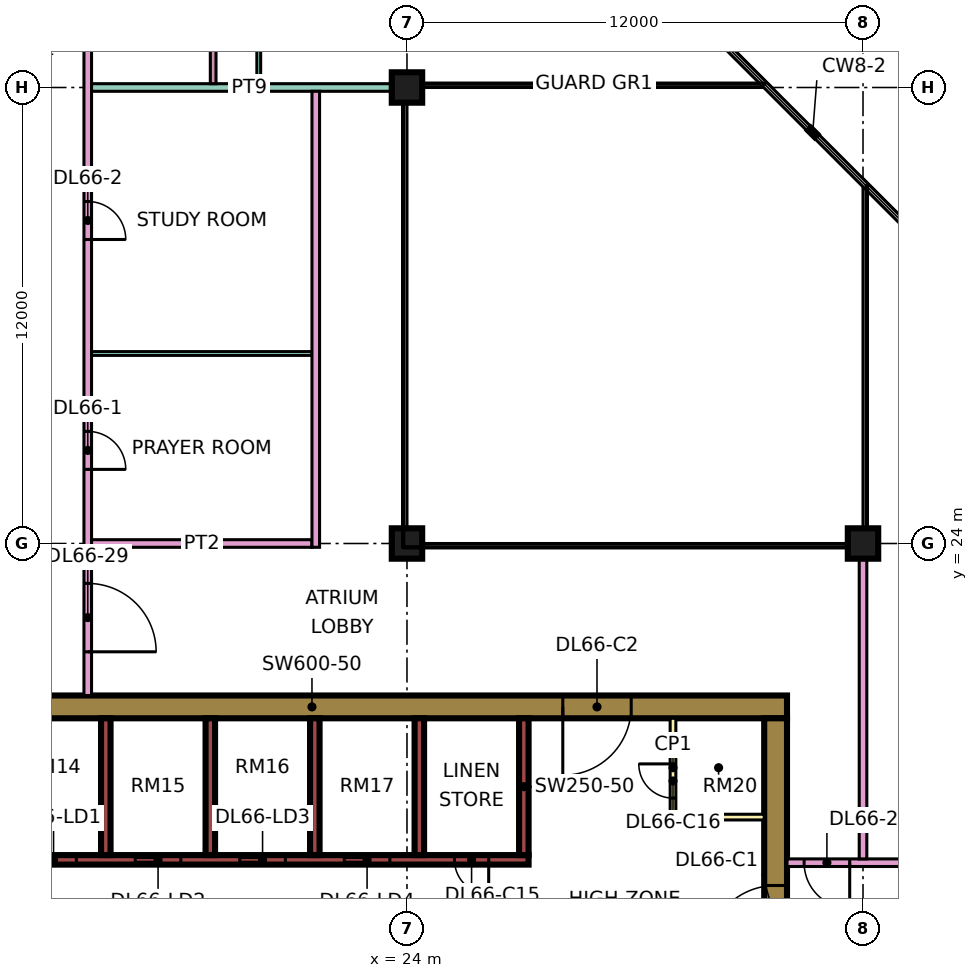
"""IFC4 building model, lengths in metres.
Left out: names, types, materials, properties, quantities, classifications, styles, units other than length and angle.
Written with IfcOpenShell. Run it as: python <this file> out.ifc"""

import sys

from ifc_helpers import new_model, si_unit, direction, frame, frame_2d, origin, origin_2d, place, context, subcontext, project, spatial, rectangle, extrude, element, fill, save


model = new_model("IFC4")
c1 = context("Model", 3, precision=1e-05, world=origin(), true_north=direction((0.0, 1.0)))
c2 = subcontext(c1, "Body", "Model", "MODEL_VIEW")
j1 = project(units=[si_unit("LENGTHUNIT", "METRE"), si_unit("PLANEANGLEUNIT", "RADIAN")], contexts=[c1])
p1 = place(None, origin())
s1 = spatial("IfcSite", under=j1, at=p1, CompositionType="ELEMENT")
p2 = place(p1, origin())
s2 = spatial("IfcBuilding", under=s1, at=p2, CompositionType="ELEMENT")
p3 = place(p2, frame((0.0, 0.0, 284.65)))
s3 = spatial("IfcBuildingStorey", under=s2, at=p3, CompositionType="ELEMENT", Elevation=284.65)
for number, where, z_axis, x_axis in (
    (1, (24.0, 24.0, 0.0), (0.0, 0.0, 1.0), (1.0, 0.0, 0.0)),
    (2, (24.0, 36.0, 0.0), (0.0, 0.0, 1.0), (1.0, 0.0, 0.0)),
    (3, (36.0, 24.0, 0.0), (0.0, 0.0, 1.0), (1.0, 0.0, 0.0)),
):
    element("IfcColumn", number, at=place(p3, frame(where, z_axis=z_axis, x_axis=x_axis)), inside=s3, PredefinedType="COLUMN", context=c2, shape_type="SweptSolid", body=[
        extrude(rectangle(XDim=0.8, YDim=0.8, at=origin_2d()), origin(), (0.0, 0.0, 1.0), 3.75),
    ])
p4 = place(p3, frame((9.0, 19.7, 0.0), z_axis=(0.0, 0.0, 1.0), x_axis=(1.0, 0.0, 0.0)))
e4 = element("IfcWall", 4, at=p4, inside=s3, PredefinedType="SHEAR", context=c2, shape_type="SweptSolid", body=[
    extrude(rectangle(XDim=25.0, YDim=0.6, at=frame_2d((12.5, 0.0))), origin(), (0.0, 0.0, 1.0), 3.75),
])
p5 = place(p4, frame((19.1, 0.0, 0.0)))
e5 = element("IfcOpeningElement", 5, at=p5, cuts=e4, PredefinedType="OPENING", context=c2, shape_type="SweptSolid", body=[
    extrude(rectangle(XDim=1.8, YDim=2.4, at=frame_2d((0.9, 1.2))), frame((0.0, 0.31, 0.0), z_axis=(0.0, -1.0, 0.0), x_axis=(1.0, 0.0, 0.0)), (0.0, 0.0, 1.0), 0.62),
])
p6 = place(p3, frame((33.7, 7.6, 0.0), z_axis=(0.0, 0.0, 1.0), x_axis=(0.0, 1.0, 0.0)))
e6 = element("IfcWall", 6, at=p6, inside=s3, PredefinedType="SHEAR", context=c2, shape_type="SweptSolid", body=[
    extrude(rectangle(XDim=11.8, YDim=0.6, at=frame_2d((5.9, 0.0))), origin(), (0.0, 0.0, 1.0), 3.75),
])
p7 = place(p6, frame((5.6, 0.0, 0.0)))
e7 = element("IfcOpeningElement", 7, at=p7, cuts=e6, PredefinedType="OPENING", context=c2, shape_type="SweptSolid", body=[
    extrude(rectangle(XDim=1.8, YDim=2.4, at=frame_2d((0.9, 1.2))), frame((0.0, 0.31, 0.0), z_axis=(0.0, -1.0, 0.0), x_axis=(1.0, 0.0, 0.0)), (0.0, 0.0, 1.0), 0.62),
])
p8 = place(p3, frame((13.45, 15.675, 0.0), z_axis=(0.0, 0.0, 1.0), x_axis=(1.0, 0.0, 0.0)))
e8 = element("IfcWall", 8, at=p8, inside=s3, PredefinedType="SHEAR", context=c2, shape_type="SweptSolid", body=[
    extrude(rectangle(XDim=13.75, YDim=0.25, at=frame_2d((6.875, 0.0))), origin(), (0.0, 0.0, 1.0), 3.75),
])
p9 = place(p8, frame((0.65, 0.0, 0.0)))
e9 = element("IfcOpeningElement", 9, at=p9, cuts=e8, PredefinedType="OPENING", context=c2, shape_type="SweptSolid", body=[
    extrude(rectangle(XDim=1.2, YDim=2.2, at=frame_2d((0.6, 1.1))), frame((0.0, 0.135, 0.0), z_axis=(0.0, -1.0, 0.0), x_axis=(1.0, 0.0, 0.0)), (0.0, 0.0, 1.0), 0.27),
])
p10 = place(p8, frame((3.4, 0.0, 0.0)))
e10 = element("IfcOpeningElement", 10, at=p10, cuts=e8, PredefinedType="OPENING", context=c2, shape_type="SweptSolid", body=[
    extrude(rectangle(XDim=1.2, YDim=2.2, at=frame_2d((0.6, 1.1))), frame((0.0, 0.135, 0.0), z_axis=(0.0, -1.0, 0.0), x_axis=(1.0, 0.0, 0.0)), (0.0, 0.0, 1.0), 0.27),
])
p11 = place(p8, frame((6.15, 0.0, 0.0)))
e11 = element("IfcOpeningElement", 11, at=p11, cuts=e8, PredefinedType="OPENING", context=c2, shape_type="SweptSolid", body=[
    extrude(rectangle(XDim=1.2, YDim=2.2, at=frame_2d((0.6, 1.1))), frame((0.0, 0.135, 0.0), z_axis=(0.0, -1.0, 0.0), x_axis=(1.0, 0.0, 0.0)), (0.0, 0.0, 1.0), 0.27),
])
p12 = place(p8, frame((8.9, 0.0, 0.0)))
e12 = element("IfcOpeningElement", 12, at=p12, cuts=e8, PredefinedType="OPENING", context=c2, shape_type="SweptSolid", body=[
    extrude(rectangle(XDim=1.2, YDim=2.2, at=frame_2d((0.6, 1.1))), frame((0.0, 0.135, 0.0), z_axis=(0.0, -1.0, 0.0), x_axis=(1.0, 0.0, 0.0)), (0.0, 0.0, 1.0), 0.27),
])
p13 = place(p8, frame((11.8, 0.0, 0.0)))
e13 = element("IfcOpeningElement", 13, at=p13, cuts=e8, PredefinedType="OPENING", context=c2, shape_type="SweptSolid", body=[
    extrude(rectangle(XDim=0.9, YDim=2.1, at=frame_2d((0.45, 1.05))), frame((0.0, 0.135, 0.0), z_axis=(0.0, -1.0, 0.0), x_axis=(1.0, 0.0, 0.0)), (0.0, 0.0, 1.0), 0.27),
])
for number, where, z_axis, x_axis in (
    (14, (16.075, 15.8, 0.0), (0.0, 0.0, 1.0), (0.0, 1.0, 0.0)),
    (15, (18.825, 15.8, 0.0), (0.0, 0.0, 1.0), (0.0, 1.0, 0.0)),
    (16, (21.575, 15.8, 0.0), (0.0, 0.0, 1.0), (0.0, 1.0, 0.0)),
    (17, (24.325, 15.8, 0.0), (0.0, 0.0, 1.0), (0.0, 1.0, 0.0)),
    (18, (27.075, 15.8, 0.0), (0.0, 0.0, 1.0), (0.0, 1.0, 0.0)),
):
    element("IfcWall", number, at=place(p3, frame(where, z_axis=z_axis, x_axis=x_axis)), inside=s3, PredefinedType="SHEAR", context=c2, shape_type="SweptSolid", body=[
        extrude(rectangle(XDim=3.6, YDim=0.25, at=frame_2d((1.8, 0.0))), origin(), (0.0, 0.0, 1.0), 3.75),
    ])
p14 = place(p3, frame((31.0, 16.8, 0.0), z_axis=(0.0, 0.0, 1.0), x_axis=(0.0, 1.0, 0.0)))
e19 = element("IfcWall", 19, at=p14, inside=s3, PredefinedType="PARTITIONING", context=c2, shape_type="SweptSolid", body=[
    extrude(rectangle(XDim=2.6, YDim=0.15, at=frame_2d((1.3, 0.0))), origin(), (0.0, 0.0, 1.0), 3.35),
])
p15 = place(p14, frame((0.5, 0.0, 0.0)))
e20 = element("IfcOpeningElement", 20, at=p15, cuts=e19, PredefinedType="OPENING", context=c2, shape_type="SweptSolid", body=[
    extrude(rectangle(XDim=0.9, YDim=2.1, at=frame_2d((0.45, 1.05))), frame((0.0, 0.085, 0.0), z_axis=(0.0, -1.0, 0.0), x_axis=(1.0, 0.0, 0.0)), (0.0, 0.0, 1.0), 0.17),
])
p16 = place(p3, frame((31.0, 16.8, 0.0), z_axis=(0.0, 0.0, 1.0), x_axis=(1.0, 0.0, 0.0)))
e21 = element("IfcWall", 21, at=p16, inside=s3, PredefinedType="PARTITIONING", context=c2, shape_type="SweptSolid", body=[
    extrude(rectangle(XDim=2.4, YDim=0.15, at=frame_2d((1.2, 0.0))), origin(), (0.0, 0.0, 1.0), 3.35),
])
p17 = place(p3, frame((15.6, 20.0, 0.0), z_axis=(0.0, 0.0, 1.0), x_axis=(0.0, 1.0, 0.0)))
e22 = element("IfcWall", 22, at=p17, inside=s3, PredefinedType="PARTITIONING", context=c2, shape_type="SweptSolid", body=[
    extrude(rectangle(XDim=27.775, YDim=0.2, at=frame_2d((13.887, 0.0))), origin(), (0.0, 0.0, 1.0), 3.35),
])
p18 = place(p17, frame((5.95, 0.0, 0.0)))
e23 = element("IfcOpeningElement", 23, at=p18, cuts=e22, PredefinedType="OPENING", context=c2, shape_type="SweptSolid", body=[
    extrude(rectangle(XDim=1.0, YDim=2.1, at=frame_2d((0.5, 1.05))), frame((0.0, 0.11, 0.0), z_axis=(0.0, -1.0, 0.0), x_axis=(1.0, 0.0, 0.0)), (0.0, 0.0, 1.0), 0.22),
])
p19 = place(p17, frame((12.0, 0.0, 0.0)))
e24 = element("IfcOpeningElement", 24, at=p19, cuts=e22, PredefinedType="OPENING", context=c2, shape_type="SweptSolid", body=[
    extrude(rectangle(XDim=1.0, YDim=2.1, at=frame_2d((0.5, 1.05))), frame((0.0, 0.11, 0.0), z_axis=(0.0, -1.0, 0.0), x_axis=(1.0, 0.0, 0.0)), (0.0, 0.0, 1.0), 0.22),
])
p20 = place(p17, frame((22.9, 0.0, 0.0)))
e25 = element("IfcOpeningElement", 25, at=p20, cuts=e22, PredefinedType="OPENING", context=c2, shape_type="SweptSolid", body=[
    extrude(rectangle(XDim=1.0, YDim=2.1, at=frame_2d((0.5, 1.05))), frame((0.0, 0.11, 0.0), z_axis=(0.0, -1.0, 0.0), x_axis=(1.0, 0.0, 0.0)), (0.0, 0.0, 1.0), 0.22),
])
p21 = place(p17, frame((1.15, 0.0, 0.0)))
e26 = element("IfcOpeningElement", 26, at=p21, cuts=e22, PredefinedType="OPENING", context=c2, shape_type="SweptSolid", body=[
    extrude(rectangle(XDim=1.8, YDim=2.1, at=frame_2d((0.9, 1.05))), frame((0.0, 0.11, 0.0), z_axis=(0.0, -1.0, 0.0), x_axis=(1.0, 0.0, 0.0)), (0.0, 0.0, 1.0), 0.22),
])
p22 = place(p17, frame((25.9, 0.0, 0.0)))
e27 = element("IfcOpeningElement", 27, at=p22, cuts=e22, PredefinedType="OPENING", context=c2, shape_type="SweptSolid", body=[
    extrude(rectangle(XDim=1.0, YDim=2.1, at=frame_2d((0.5, 1.05))), frame((0.0, 0.11, 0.0), z_axis=(0.0, -1.0, 0.0), x_axis=(1.0, 0.0, 0.0)), (0.0, 0.0, 1.0), 0.22),
])
p23 = place(p3, frame((15.7, 24.0, 0.0), z_axis=(0.0, 0.0, 1.0), x_axis=(1.0, 0.0, 0.0)))
e28 = element("IfcWall", 28, at=p23, inside=s3, PredefinedType="PARTITIONING", context=c2, shape_type="SweptSolid", body=[
    extrude(rectangle(XDim=5.8, YDim=0.2, at=frame_2d((2.9, 0.0))), origin(), (0.0, 0.0, 1.0), 3.35),
])
p24 = place(p3, frame((15.7, 29.0, 0.0), z_axis=(0.0, 0.0, 1.0), x_axis=(1.0, 0.0, 0.0)))
e29 = element("IfcWall", 29, at=p24, inside=s3, PredefinedType="PARTITIONING", context=c2, shape_type="SweptSolid", body=[
    extrude(rectangle(XDim=5.8, YDim=0.1, at=frame_2d((2.9, 0.0))), origin(), (0.0, 0.0, 1.0), 3.35),
])
p25 = place(p3, frame((15.7, 36.0, 0.0), z_axis=(0.0, 0.0, 1.0), x_axis=(1.0, 0.0, 0.0)))
e30 = element("IfcWall", 30, at=p25, inside=s3, PredefinedType="PARTITIONING", context=c2, shape_type="SweptSolid", body=[
    extrude(rectangle(XDim=8.3, YDim=0.2, at=frame_2d((4.15, 0.0))), origin(), (0.0, 0.0, 1.0), 3.35),
])
p26 = place(p3, frame((18.9, 36.1, 0.0), z_axis=(0.0, 0.0, 1.0), x_axis=(0.0, 1.0, 0.0)))
e31 = element("IfcWall", 31, at=p26, inside=s3, PredefinedType="PARTITIONING", context=c2, shape_type="SweptSolid", body=[
    extrude(rectangle(XDim=5.675, YDim=0.15, at=frame_2d((2.837, 0.0))), origin(), (0.0, 0.0, 1.0), 3.35),
])
p27 = place(p26, frame((1.1, 0.0, 0.0)))
e32 = element("IfcOpeningElement", 32, at=p27, cuts=e31, PredefinedType="OPENING", context=c2, shape_type="SweptSolid", body=[
    extrude(rectangle(XDim=0.9, YDim=2.1, at=frame_2d((0.45, 1.05))), frame((0.0, 0.085, 0.0), z_axis=(0.0, -1.0, 0.0), x_axis=(1.0, 0.0, 0.0)), (0.0, 0.0, 1.0), 0.17),
])
p28 = place(p3, frame((20.1, 36.1, 0.0), z_axis=(0.0, 0.0, 1.0), x_axis=(0.0, 1.0, 0.0)))
e33 = element("IfcWall", 33, at=p28, inside=s3, PredefinedType="PARTITIONING", context=c2, shape_type="SweptSolid", body=[
    extrude(rectangle(XDim=5.95, YDim=0.1, at=frame_2d((2.975, 0.0))), origin(), (0.0, 0.0, 1.0), 3.35),
])
p29 = place(p28, frame((0.95, 0.0, 0.0)))
e34 = element("IfcOpeningElement", 34, at=p29, cuts=e33, PredefinedType="OPENING", context=c2, shape_type="SweptSolid", body=[
    extrude(rectangle(XDim=0.9, YDim=2.1, at=frame_2d((0.45, 1.05))), frame((0.0, 0.06, 0.0), z_axis=(0.0, -1.0, 0.0), x_axis=(1.0, 0.0, 0.0)), (0.0, 0.0, 1.0), 0.12),
])
p30 = place(p28, frame((3.95, 0.0, 0.0)))
e35 = element("IfcOpeningElement", 35, at=p30, cuts=e33, PredefinedType="OPENING", context=c2, shape_type="SweptSolid", body=[
    extrude(rectangle(XDim=0.9, YDim=2.1, at=frame_2d((0.45, 1.05))), frame((0.0, 0.06, 0.0), z_axis=(0.0, -1.0, 0.0), x_axis=(1.0, 0.0, 0.0)), (0.0, 0.0, 1.0), 0.12),
])
p31 = place(p3, frame((21.6, 23.9, 0.0), z_axis=(0.0, 0.0, 1.0), x_axis=(0.0, 1.0, 0.0)))
e36 = element("IfcWall", 36, at=p31, inside=s3, PredefinedType="PARTITIONING", context=c2, shape_type="SweptSolid", body=[
    extrude(rectangle(XDim=12.0, YDim=0.2, at=frame_2d((6.0, 0.0))), origin(), (0.0, 0.0, 1.0), 3.35),
])
p32 = place(p3, frame((34.0, 15.6, 0.0), z_axis=(0.0, 0.0, 1.0), x_axis=(1.0, 0.0, 0.0)))
e37 = element("IfcWall", 37, at=p32, inside=s3, PredefinedType="PARTITIONING", context=c2, shape_type="SweptSolid", body=[
    extrude(rectangle(XDim=10.35, YDim=0.2, at=frame_2d((5.175, 0.0))), origin(), (0.0, 0.0, 1.0), 3.35),
])
p33 = place(p32, frame((5.6, 0.0, 0.0)))
e38 = element("IfcOpeningElement", 38, at=p33, cuts=e37, PredefinedType="OPENING", context=c2, shape_type="SweptSolid", body=[
    extrude(rectangle(XDim=1.0, YDim=2.1, at=frame_2d((0.5, 1.05))), frame((0.0, 0.11, 0.0), z_axis=(0.0, -1.0, 0.0), x_axis=(1.0, 0.0, 0.0)), (0.0, 0.0, 1.0), 0.22),
])
p34 = place(p32, frame((0.45, 0.0, 0.0)))
e39 = element("IfcOpeningElement", 39, at=p34, cuts=e37, PredefinedType="OPENING", context=c2, shape_type="SweptSolid", body=[
    extrude(rectangle(XDim=1.2, YDim=2.1, at=frame_2d((0.6, 1.05))), frame((0.0, 0.11, 0.0), z_axis=(0.0, -1.0, 0.0), x_axis=(1.0, 0.0, 0.0)), (0.0, 0.0, 1.0), 0.22),
])
p35 = place(p3, frame((36.0, 15.7, 0.0), z_axis=(0.0, 0.0, 1.0), x_axis=(0.0, 1.0, 0.0)))
e40 = element("IfcWall", 40, at=p35, inside=s3, PredefinedType="PARTITIONING", context=c2, shape_type="SweptSolid", body=[
    extrude(rectangle(XDim=8.3, YDim=0.2, at=frame_2d((4.15, 0.0))), origin(), (0.0, 0.0, 1.0), 3.35),
])
p36 = place(p9, origin())
e41 = element("IfcDoor", 41, at=p36, inside=s3, OperationType="DOUBLE_DOOR_SLIDING", PredefinedType="DOOR", context=c2, shape_type="SweptSolid", body=[
    extrude(rectangle(XDim=1.2, YDim=2.2, at=frame_2d((0.6, 1.1))), frame((0.0, 0.025, 0.0), z_axis=(0.0, -1.0, 0.0), x_axis=(1.0, 0.0, 0.0)), (0.0, 0.0, 1.0), 0.05),
])
fill(e9, e41)
p37 = place(p10, origin())
e42 = element("IfcDoor", 42, at=p37, inside=s3, OperationType="DOUBLE_DOOR_SLIDING", PredefinedType="DOOR", context=c2, shape_type="SweptSolid", body=[
    extrude(rectangle(XDim=1.2, YDim=2.2, at=frame_2d((0.6, 1.1))), frame((0.0, 0.025, 0.0), z_axis=(0.0, -1.0, 0.0), x_axis=(1.0, 0.0, 0.0)), (0.0, 0.0, 1.0), 0.05),
])
fill(e10, e42)
p38 = place(p11, origin())
e43 = element("IfcDoor", 43, at=p38, inside=s3, OperationType="DOUBLE_DOOR_SLIDING", PredefinedType="DOOR", context=c2, shape_type="SweptSolid", body=[
    extrude(rectangle(XDim=1.2, YDim=2.2, at=frame_2d((0.6, 1.1))), frame((0.0, 0.025, 0.0), z_axis=(0.0, -1.0, 0.0), x_axis=(1.0, 0.0, 0.0)), (0.0, 0.0, 1.0), 0.05),
])
fill(e11, e43)
p39 = place(p12, origin())
e44 = element("IfcDoor", 44, at=p39, inside=s3, OperationType="DOUBLE_DOOR_SLIDING", PredefinedType="DOOR", context=c2, shape_type="SweptSolid", body=[
    extrude(rectangle(XDim=1.2, YDim=2.2, at=frame_2d((0.6, 1.1))), frame((0.0, 0.025, 0.0), z_axis=(0.0, -1.0, 0.0), x_axis=(1.0, 0.0, 0.0)), (0.0, 0.0, 1.0), 0.05),
])
fill(e12, e44)
p40 = place(p7, origin())
e45 = element("IfcDoor", 45, at=p40, inside=s3, OperationType="DOUBLE_DOOR_SINGLE_SWING", PredefinedType="DOOR", context=c2, shape_type="SweptSolid", body=[
    extrude(rectangle(XDim=1.8, YDim=2.4, at=frame_2d((0.9, 1.2))), frame((0.0, 0.025, 0.0), z_axis=(0.0, -1.0, 0.0), x_axis=(1.0, 0.0, 0.0)), (0.0, 0.0, 1.0), 0.05),
])
fill(e7, e45)
p41 = place(p5, frame((1.8, 0.0, 0.0), z_axis=(0.0, 0.0, 1.0), x_axis=(-1.0, 0.0, 0.0)))
e46 = element("IfcDoor", 46, at=p41, inside=s3, OperationType="DOUBLE_DOOR_SINGLE_SWING", PredefinedType="DOOR", context=c2, shape_type="SweptSolid", body=[
    extrude(rectangle(XDim=1.8, YDim=2.4, at=frame_2d((0.9, 1.2))), frame((0.0, 0.025, 0.0), z_axis=(0.0, -1.0, 0.0), x_axis=(1.0, 0.0, 0.0)), (0.0, 0.0, 1.0), 0.05),
])
fill(e5, e46)
p42 = place(p13, origin())
e47 = element("IfcDoor", 47, at=p42, inside=s3, OperationType="SINGLE_SWING_RIGHT", PredefinedType="DOOR", context=c2, shape_type="SweptSolid", body=[
    extrude(rectangle(XDim=0.9, YDim=2.1, at=frame_2d((0.45, 1.05))), frame((0.0, 0.025, 0.0), z_axis=(0.0, -1.0, 0.0), x_axis=(1.0, 0.0, 0.0)), (0.0, 0.0, 1.0), 0.05),
])
fill(e13, e47)
p43 = place(p15, frame((0.9, 0.0, 0.0), z_axis=(0.0, 0.0, 1.0), x_axis=(-1.0, 0.0, 0.0)))
e48 = element("IfcDoor", 48, at=p43, inside=s3, OperationType="SINGLE_SWING_RIGHT", PredefinedType="DOOR", context=c2, shape_type="SweptSolid", body=[
    extrude(rectangle(XDim=0.9, YDim=2.1, at=frame_2d((0.45, 1.05))), frame((0.0, 0.025, 0.0), z_axis=(0.0, -1.0, 0.0), x_axis=(1.0, 0.0, 0.0)), (0.0, 0.0, 1.0), 0.05),
])
fill(e20, e48)
p44 = place(p18, frame((1.0, 0.0, 0.0), z_axis=(0.0, 0.0, 1.0), x_axis=(-1.0, 0.0, 0.0)))
e49 = element("IfcDoor", 49, at=p44, inside=s3, OperationType="SINGLE_SWING_LEFT", PredefinedType="DOOR", context=c2, shape_type="SweptSolid", body=[
    extrude(rectangle(XDim=1.0, YDim=2.1, at=frame_2d((0.5, 1.05))), frame((0.0, 0.025, 0.0), z_axis=(0.0, -1.0, 0.0), x_axis=(1.0, 0.0, 0.0)), (0.0, 0.0, 1.0), 0.05),
])
fill(e23, e49)
p45 = place(p19, frame((1.0, 0.0, 0.0), z_axis=(0.0, 0.0, 1.0), x_axis=(-1.0, 0.0, 0.0)))
e50 = element("IfcDoor", 50, at=p45, inside=s3, OperationType="SINGLE_SWING_LEFT", PredefinedType="DOOR", context=c2, shape_type="SweptSolid", body=[
    extrude(rectangle(XDim=1.0, YDim=2.1, at=frame_2d((0.5, 1.05))), frame((0.0, 0.025, 0.0), z_axis=(0.0, -1.0, 0.0), x_axis=(1.0, 0.0, 0.0)), (0.0, 0.0, 1.0), 0.05),
])
fill(e24, e50)
p46 = place(p34, origin())
e51 = element("IfcDoor", 51, at=p46, inside=s3, OperationType="SINGLE_SWING_RIGHT", PredefinedType="DOOR", context=c2, shape_type="SweptSolid", body=[
    extrude(rectangle(XDim=1.2, YDim=2.1, at=frame_2d((0.6, 1.05))), frame((0.0, 0.025, 0.0), z_axis=(0.0, -1.0, 0.0), x_axis=(1.0, 0.0, 0.0)), (0.0, 0.0, 1.0), 0.05),
])
fill(e39, e51)
p47 = place(p21, frame((1.8, 0.0, 0.0), z_axis=(0.0, 0.0, 1.0), x_axis=(-1.0, 0.0, 0.0)))
e52 = element("IfcDoor", 52, at=p47, inside=s3, OperationType="DOUBLE_DOOR_SINGLE_SWING", PredefinedType="DOOR", context=c2, shape_type="SweptSolid", body=[
    extrude(rectangle(XDim=1.8, YDim=2.1, at=frame_2d((0.9, 1.05))), frame((0.0, 0.025, 0.0), z_axis=(0.0, -1.0, 0.0), x_axis=(1.0, 0.0, 0.0)), (0.0, 0.0, 1.0), 0.05),
])
fill(e26, e52)
save(model, sys.argv[1])
